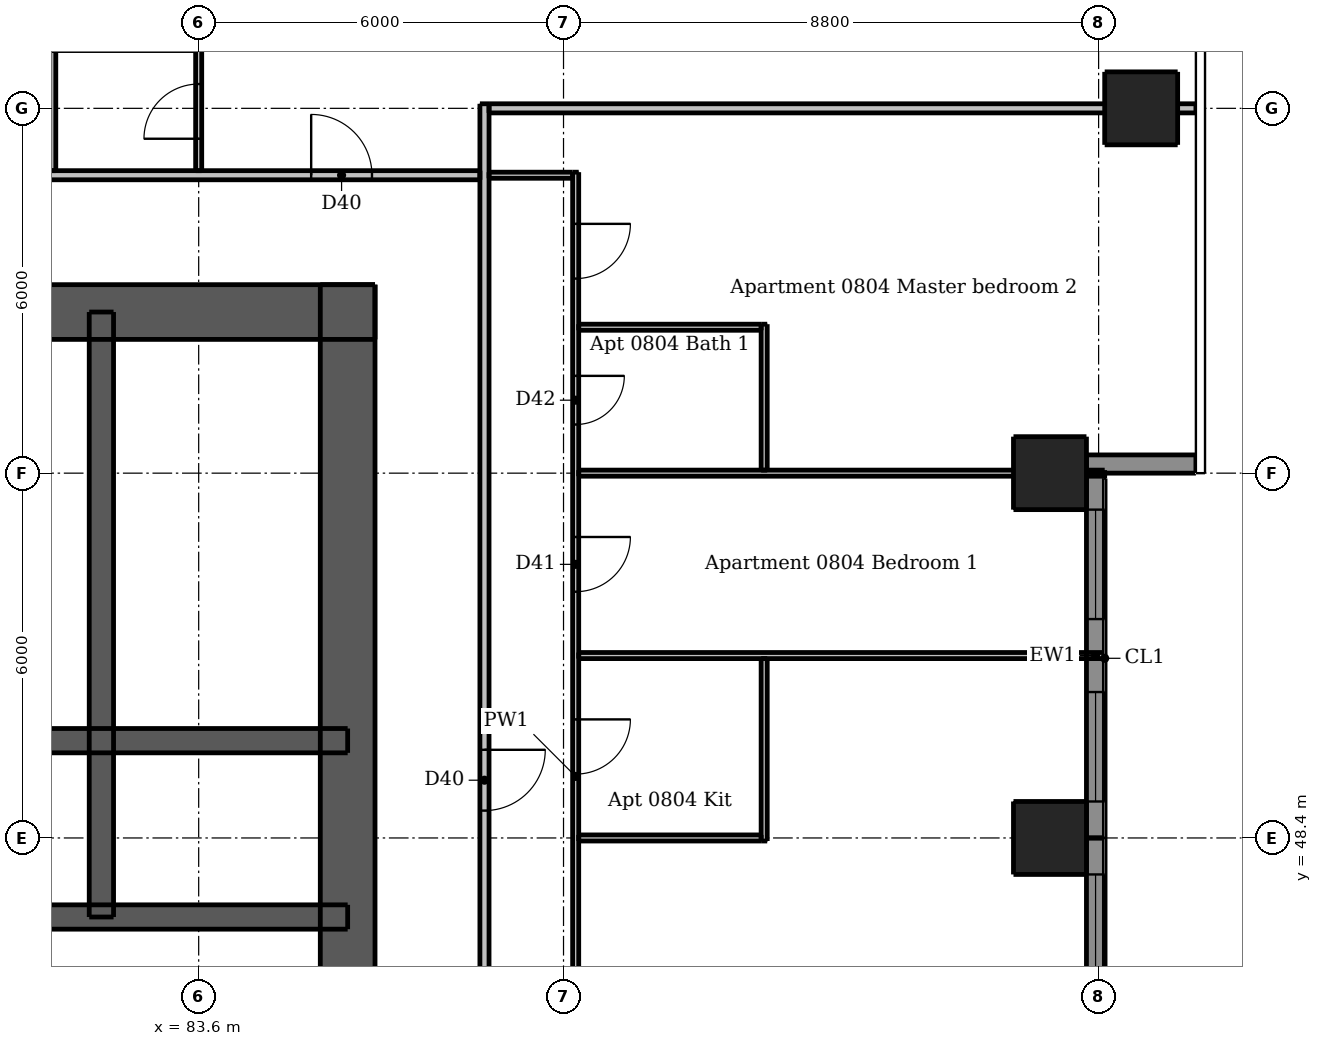
"""IFC4 building model, lengths in metres.
Left out: names, types, materials, properties, quantities, classifications, styles, units other than length and angle.
Written with IfcOpenShell. Run it as: python <this file> out.ifc"""

import sys

from ifc_helpers import new_model, si_unit, direction, frame, frame_2d, origin, origin_2d, place, context, subcontext, project, spatial, rectangle, extrude, element, fill, save


model = new_model("IFC4")
c1 = context("Model", 3, precision=1e-05, world=origin(), true_north=direction((0.0, 1.0)))
c2 = subcontext(c1, "Body", "Model", "MODEL_VIEW")
j1 = project(units=[si_unit("LENGTHUNIT", "METRE"), si_unit("PLANEANGLEUNIT", "RADIAN")], contexts=[c1])
p1 = place(None, origin())
s1 = spatial("IfcSite", under=j1, at=p1, CompositionType="ELEMENT")
p2 = place(p1, origin())
s2 = spatial("IfcBuilding", under=s1, at=p2, CompositionType="ELEMENT")
p3 = place(p2, frame((0.0, 0.0, 33.4)))
s3 = spatial("IfcBuildingStorey", under=s2, at=p3, CompositionType="ELEMENT", Elevation=33.4)
p4 = place(p3, frame((62.5, 57.05, 0.0), z_axis=(0.0, 0.0, 1.0), x_axis=(1.0, 0.0, 0.0)))
e1 = element("IfcWall", 1, at=p4, inside=s3, PredefinedType="SHEAR", context=c2, shape_type="SweptSolid", body=[
    extrude(rectangle(XDim=24.0, YDim=0.9, at=frame_2d((12.0, 0.0))), origin(), (0.0, 0.0, 1.0), 3.05),
])
p5 = place(p4, frame((20.85, 0.0, 0.0)))
e2 = element("IfcOpeningElement", 2, at=p5, cuts=e1, PredefinedType="OPENING", context=c2, shape_type="SweptSolid", body=[
    extrude(rectangle(XDim=1.1, YDim=2.1, at=frame_2d((0.55, 1.05))), frame((0.0, 0.46, 0.0), z_axis=(0.0, -1.0, 0.0), x_axis=(1.0, 0.0, 0.0)), (0.0, 0.0, 1.0), 0.92),
])
p6 = place(p4, frame((2.05, 0.0, 0.0)))
e3 = element("IfcOpeningElement", 3, at=p6, cuts=e1, PredefinedType="OPENING", context=c2, shape_type="SweptSolid", body=[
    extrude(rectangle(XDim=1.1, YDim=2.1, at=frame_2d((0.55, 1.05))), frame((0.0, 0.46, 0.0), z_axis=(0.0, -1.0, 0.0), x_axis=(1.0, 0.0, 0.0)), (0.0, 0.0, 1.0), 0.92),
])
p7 = place(p4, frame((7.9, 0.0, 0.0)))
e4 = element("IfcOpeningElement", 4, at=p7, cuts=e1, PredefinedType="OPENING", context=c2, shape_type="SweptSolid", body=[
    extrude(rectangle(XDim=0.9, YDim=2.1, at=frame_2d((0.45, 1.05))), frame((0.0, 0.46, 0.0), z_axis=(0.0, -1.0, 0.0), x_axis=(1.0, 0.0, 0.0)), (0.0, 0.0, 1.0), 0.92),
])
p8 = place(p4, frame((15.2, 0.0, 0.0)))
e5 = element("IfcOpeningElement", 5, at=p8, cuts=e1, PredefinedType="OPENING", context=c2, shape_type="SweptSolid", body=[
    extrude(rectangle(XDim=0.9, YDim=2.1, at=frame_2d((0.45, 1.05))), frame((0.0, 0.46, 0.0), z_axis=(0.0, -1.0, 0.0), x_axis=(1.0, 0.0, 0.0)), (0.0, 0.0, 1.0), 0.92),
])
p9 = place(p3, frame((86.05, 33.5, 0.0), z_axis=(0.0, 0.0, 1.0), x_axis=(0.0, 1.0, 0.0)))
e6 = element("IfcWall", 6, at=p9, inside=s3, PredefinedType="SHEAR", context=c2, shape_type="SweptSolid", body=[
    extrude(rectangle(XDim=24.0, YDim=0.9, at=frame_2d((12.0, 0.0))), origin(), (0.0, 0.0, 1.0), 3.05),
])
p10 = place(p9, frame((11.2, 0.0, 0.0)))
e7 = element("IfcOpeningElement", 7, at=p10, cuts=e6, PredefinedType="OPENING", context=c2, shape_type="SweptSolid", body=[
    extrude(rectangle(XDim=1.6, YDim=2.1, at=frame_2d((0.8, 1.05))), frame((0.0, 0.46, 0.0), z_axis=(0.0, -1.0, 0.0), x_axis=(1.0, 0.0, 0.0)), (0.0, 0.0, 1.0), 0.92),
])
p11 = place(p3, frame((62.95, 47.1, 0.0), z_axis=(0.0, 0.0, 1.0), x_axis=(1.0, 0.0, 0.0)))
e8 = element("IfcWall", 8, at=p11, inside=s3, PredefinedType="SHEAR", context=c2, shape_type="SweptSolid", body=[
    extrude(rectangle(XDim=23.1, YDim=0.4, at=frame_2d((11.55, 0.0))), origin(), (0.0, 0.0, 1.0), 3.05),
])
p12 = place(p11, frame((1.7, 0.0, 0.0)))
e9 = element("IfcOpeningElement", 9, at=p12, cuts=e8, PredefinedType="OPENING", context=c2, shape_type="SweptSolid", body=[
    extrude(rectangle(XDim=0.9, YDim=2.1, at=frame_2d((0.45, 1.05))), frame((0.0, 0.21, 0.0), z_axis=(0.0, -1.0, 0.0), x_axis=(1.0, 0.0, 0.0)), (0.0, 0.0, 1.0), 0.42),
])
p13 = place(p11, frame((20.5, 0.0, 0.0)))
e10 = element("IfcOpeningElement", 10, at=p13, cuts=e8, PredefinedType="OPENING", context=c2, shape_type="SweptSolid", body=[
    extrude(rectangle(XDim=0.9, YDim=2.1, at=frame_2d((0.45, 1.05))), frame((0.0, 0.21, 0.0), z_axis=(0.0, -1.0, 0.0), x_axis=(1.0, 0.0, 0.0)), (0.0, 0.0, 1.0), 0.42),
])
p14 = place(p3, frame((62.95, 50.0, 0.0), z_axis=(0.0, 0.0, 1.0), x_axis=(1.0, 0.0, 0.0)))
e11 = element("IfcWall", 11, at=p14, inside=s3, PredefinedType="SHEAR", context=c2, shape_type="SweptSolid", body=[
    extrude(rectangle(XDim=23.1, YDim=0.4, at=frame_2d((11.55, 0.0))), origin(), (0.0, 0.0, 1.0), 3.05),
])
p15 = place(p3, frame((82.0, 47.1, 0.0), z_axis=(0.0, 0.0, 1.0), x_axis=(0.0, 1.0, 0.0)))
e12 = element("IfcWall", 12, at=p15, inside=s3, PredefinedType="SHEAR", context=c2, shape_type="SweptSolid", body=[
    extrude(rectangle(XDim=9.95, YDim=0.4, at=frame_2d((4.975, 0.0))), origin(), (0.0, 0.0, 1.0), 3.05),
])
for number, where, z_axis, x_axis in (
    (13, (97.6, 48.4, 0.0), (0.0, 0.0, 1.0), (1.0, 0.0, 0.0)),
    (14, (97.6, 54.4, 0.0), (0.0, 0.0, 1.0), (1.0, 0.0, 0.0)),
    (15, (99.1, 60.4, 0.0), (0.0, 0.0, 1.0), (1.0, 0.0, 0.0)),
):
    element("IfcColumn", number, at=place(p3, frame(where, z_axis=z_axis, x_axis=x_axis)), inside=s3, PredefinedType="COLUMN", context=c2, shape_type="SweptSolid", body=[
        extrude(rectangle(XDim=1.2, YDim=1.2, at=origin_2d()), origin(), (0.0, 0.0, 1.0), 3.05),
    ])
p16 = place(p3, frame((98.2, 54.55, 0.0), z_axis=(0.0, 0.0, 1.0), x_axis=(1.0, 0.0, 0.0)))
e16 = element("IfcWall", 16, at=p16, inside=s3, PredefinedType="SOLIDWALL", context=c2, shape_type="SweptSolid", body=[
    extrude(rectangle(XDim=1.8, YDim=0.3, at=frame_2d((0.9, 0.0))), origin(), (0.0, 0.0, 1.0), 3.05),
])
p17 = place(p3, frame((98.35, 42.7, 0.0), z_axis=(0.0, 0.0, 1.0), x_axis=(0.0, 1.0, 0.0)))
e17 = element("IfcWall", 17, at=p17, inside=s3, PredefinedType="SOLIDWALL", context=c2, shape_type="SweptSolid", body=[
    extrude(rectangle(XDim=5.7, YDim=0.3, at=frame_2d((2.85, 0.0))), origin(), (0.0, 0.0, 1.0), 3.05),
])
p18 = place(p17, frame((0.3, 0.0, 0.15)))
e18 = element("IfcOpeningElement", 18, at=p18, cuts=e17, PredefinedType="OPENING", context=c2, shape_type="SweptSolid", body=[
    extrude(rectangle(XDim=1.8, YDim=2.1, at=frame_2d((0.9, 1.05))), frame((0.0, 0.16, 0.0), z_axis=(0.0, -1.0, 0.0), x_axis=(1.0, 0.0, 0.0)), (0.0, 0.0, 1.0), 0.32),
])
p19 = place(p17, frame((3.3, 0.0, 0.15)))
e19 = element("IfcOpeningElement", 19, at=p19, cuts=e17, PredefinedType="OPENING", context=c2, shape_type="SweptSolid", body=[
    extrude(rectangle(XDim=1.8, YDim=2.1, at=frame_2d((0.9, 1.05))), frame((0.0, 0.16, 0.0), z_axis=(0.0, -1.0, 0.0), x_axis=(1.0, 0.0, 0.0)), (0.0, 0.0, 1.0), 0.32),
])
p20 = place(p3, frame((98.35, 48.4, 0.0), z_axis=(0.0, 0.0, 1.0), x_axis=(0.0, 1.0, 0.0)))
e20 = element("IfcWall", 20, at=p20, inside=s3, PredefinedType="SOLIDWALL", context=c2, shape_type="SweptSolid", body=[
    extrude(rectangle(XDim=6.0, YDim=0.3, at=frame_2d((3.0, 0.0))), origin(), (0.0, 0.0, 1.0), 3.05),
])
p21 = place(p20, frame((0.6, 0.0, 0.15)))
e21 = element("IfcOpeningElement", 21, at=p21, cuts=e20, PredefinedType="OPENING", context=c2, shape_type="SweptSolid", body=[
    extrude(rectangle(XDim=1.8, YDim=2.1, at=frame_2d((0.9, 1.05))), frame((0.0, 0.16, 0.0), z_axis=(0.0, -1.0, 0.0), x_axis=(1.0, 0.0, 0.0)), (0.0, 0.0, 1.0), 0.32),
])
p22 = place(p20, frame((3.6, 0.0, 0.15)))
e22 = element("IfcOpeningElement", 22, at=p22, cuts=e20, PredefinedType="OPENING", context=c2, shape_type="SweptSolid", body=[
    extrude(rectangle(XDim=1.8, YDim=2.1, at=frame_2d((0.9, 1.05))), frame((0.0, 0.16, 0.0), z_axis=(0.0, -1.0, 0.0), x_axis=(1.0, 0.0, 0.0)), (0.0, 0.0, 1.0), 0.32),
])
p23 = place(p3, frame((81.2, 59.375, 0.0), z_axis=(0.0, 0.0, 1.0), x_axis=(0.0, 1.0, 0.0)))
e23 = element("IfcWall", 23, at=p23, inside=s3, PredefinedType="PARTITIONING", context=c2, shape_type="SweptSolid", body=[
    extrude(rectangle(XDim=1.975, YDim=0.1, at=frame_2d((0.988, 0.0))), origin(), (0.0, 0.0, 1.0), 3.05),
])
p24 = place(p3, frame((83.6, 59.375, 0.0), z_axis=(0.0, 0.0, 1.0), x_axis=(0.0, 1.0, 0.0)))
e24 = element("IfcWall", 24, at=p24, inside=s3, PredefinedType="PARTITIONING", context=c2, shape_type="SweptSolid", body=[
    extrude(rectangle(XDim=8.625, YDim=0.1, at=frame_2d((4.312, 0.0))), origin(), (0.0, 0.0, 1.0), 2.516),
])
p25 = place(p24, frame((0.525, 0.0, 0.0)))
e25 = element("IfcOpeningElement", 25, at=p25, cuts=e24, PredefinedType="OPENING", context=c2, shape_type="SweptSolid", body=[
    extrude(rectangle(XDim=0.9, YDim=2.1, at=frame_2d((0.45, 1.05))), frame((0.0, 0.06, 0.0), z_axis=(0.0, -1.0, 0.0), x_axis=(1.0, 0.0, 0.0)), (0.0, 0.0, 1.0), 0.12),
])
p26 = place(p24, frame((4.875, 0.0, 0.0)))
e26 = element("IfcOpeningElement", 26, at=p26, cuts=e24, PredefinedType="OPENING", context=c2, shape_type="SweptSolid", body=[
    extrude(rectangle(XDim=0.9, YDim=2.1, at=frame_2d((0.45, 1.05))), frame((0.0, 0.06, 0.0), z_axis=(0.0, -1.0, 0.0), x_axis=(1.0, 0.0, 0.0)), (0.0, 0.0, 1.0), 0.12),
])
p27 = place(p3, frame((89.8, 59.35, 0.0), z_axis=(0.0, 0.0, 1.0), x_axis=(0.0, -1.0, 0.0)))
e27 = element("IfcWall", 27, at=p27, inside=s3, PredefinedType="PARTITIONING", context=c2, shape_type="SweptSolid", body=[
    extrude(rectangle(XDim=19.875, YDim=0.1, at=frame_2d((9.938, 0.0))), origin(), (0.0, 0.0, 1.0), 3.05),
])
p28 = place(p27, frame((15.0, 0.0, 0.0)))
e28 = element("IfcOpeningElement", 28, at=p28, cuts=e27, PredefinedType="OPENING", context=c2, shape_type="SweptSolid", body=[
    extrude(rectangle(XDim=0.9, YDim=2.1, at=frame_2d((0.45, 1.05))), frame((0.0, 0.06, 0.0), z_axis=(0.0, -1.0, 0.0), x_axis=(1.0, 0.0, 0.0)), (0.0, 0.0, 1.0), 0.12),
])
p29 = place(p27, frame((9.0, 0.0, 0.0)))
e29 = element("IfcOpeningElement", 29, at=p29, cuts=e27, PredefinedType="OPENING", context=c2, shape_type="SweptSolid", body=[
    extrude(rectangle(XDim=0.9, YDim=2.1, at=frame_2d((0.45, 1.05))), frame((0.0, 0.06, 0.0), z_axis=(0.0, -1.0, 0.0), x_axis=(1.0, 0.0, 0.0)), (0.0, 0.0, 1.0), 0.12),
])
p30 = place(p27, frame((6.0, 0.0, 0.0)))
e30 = element("IfcOpeningElement", 30, at=p30, cuts=e27, PredefinedType="OPENING", context=c2, shape_type="SweptSolid", body=[
    extrude(rectangle(XDim=0.9, YDim=2.1, at=frame_2d((0.45, 1.05))), frame((0.0, 0.06, 0.0), z_axis=(0.0, -1.0, 0.0), x_axis=(1.0, 0.0, 0.0)), (0.0, 0.0, 1.0), 0.12),
])
p31 = place(p27, frame((0.85, 0.0, 0.0)))
e31 = element("IfcOpeningElement", 31, at=p31, cuts=e27, PredefinedType="OPENING", context=c2, shape_type="SweptSolid", body=[
    extrude(rectangle(XDim=0.9, YDim=2.1, at=frame_2d((0.45, 1.05))), frame((0.0, 0.06, 0.0), z_axis=(0.0, -1.0, 0.0), x_axis=(1.0, 0.0, 0.0)), (0.0, 0.0, 1.0), 0.12),
])
p32 = place(p27, frame((3.35, 0.0, 0.0)))
e32 = element("IfcOpeningElement", 32, at=p32, cuts=e27, PredefinedType="OPENING", context=c2, shape_type="SweptSolid", body=[
    extrude(rectangle(XDim=0.8, YDim=2.1, at=frame_2d((0.4, 1.05))), frame((0.0, 0.06, 0.0), z_axis=(0.0, -1.0, 0.0), x_axis=(1.0, 0.0, 0.0)), (0.0, 0.0, 1.0), 0.12),
])
p33 = place(p3, frame((92.9, 48.35, 0.0), z_axis=(0.0, 0.0, 1.0), x_axis=(0.0, 1.0, 0.0)))
e33 = element("IfcWall", 33, at=p33, inside=s3, PredefinedType="PARTITIONING", context=c2, shape_type="SweptSolid", body=[
    extrude(rectangle(XDim=3.0, YDim=0.1, at=frame_2d((1.5, 0.0))), origin(), (0.0, 0.0, 1.0), 3.05),
])
p34 = place(p3, frame((92.9, 54.45, 0.0), z_axis=(0.0, 0.0, 1.0), x_axis=(0.0, 1.0, 0.0)))
e34 = element("IfcWall", 34, at=p34, inside=s3, PredefinedType="PARTITIONING", context=c2, shape_type="SweptSolid", body=[
    extrude(rectangle(XDim=2.4, YDim=0.1, at=frame_2d((1.2, 0.0))), origin(), (0.0, 0.0, 1.0), 3.05),
])
p35 = place(p3, frame((88.375, 59.3, 0.0), z_axis=(0.0, 0.0, 1.0), x_axis=(1.0, 0.0, 0.0)))
e35 = element("IfcWall", 35, at=p35, inside=s3, PredefinedType="PARTITIONING", context=c2, shape_type="SweptSolid", body=[
    extrude(rectangle(XDim=1.375, YDim=0.1, at=frame_2d((0.688, 0.0))), origin(), (0.0, 0.0, 1.0), 3.05),
])
p36 = place(p3, frame((89.85, 56.8, 0.0), z_axis=(0.0, 0.0, 1.0), x_axis=(1.0, 0.0, 0.0)))
e36 = element("IfcWall", 36, at=p36, inside=s3, PredefinedType="PARTITIONING", context=c2, shape_type="SweptSolid", body=[
    extrude(rectangle(XDim=3.0, YDim=0.1, at=frame_2d((1.5, 0.0))), origin(), (0.0, 0.0, 1.0), 3.05),
])
p37 = place(p3, frame((89.85, 54.4, 0.0), z_axis=(0.0, 0.0, 1.0), x_axis=(1.0, 0.0, 0.0)))
e37 = element("IfcWall", 37, at=p37, inside=s3, PredefinedType="PARTITIONING", context=c2, shape_type="SweptSolid", body=[
    extrude(rectangle(XDim=8.65, YDim=0.1, at=frame_2d((4.325, 0.0))), origin(), (0.0, 0.0, 1.0), 2.516),
])
p38 = place(p3, frame((89.85, 51.4, 0.0), z_axis=(0.0, 0.0, 1.0), x_axis=(1.0, 0.0, 0.0)))
e38 = element("IfcWall", 38, at=p38, inside=s3, PredefinedType="PARTITIONING", context=c2, shape_type="SweptSolid", body=[
    extrude(rectangle(XDim=8.65, YDim=0.1, at=frame_2d((4.325, 0.0))), origin(), (0.0, 0.0, 1.0), 3.05),
])
p39 = place(p3, frame((89.85, 48.4, 0.0), z_axis=(0.0, 0.0, 1.0), x_axis=(1.0, 0.0, 0.0)))
e39 = element("IfcWall", 39, at=p39, inside=s3, PredefinedType="PARTITIONING", context=c2, shape_type="SweptSolid", body=[
    extrude(rectangle(XDim=3.0, YDim=0.1, at=frame_2d((1.5, 0.0))), origin(), (0.0, 0.0, 1.0), 2.516),
])
p40 = place(p3, frame((88.3, 60.475, 0.0), z_axis=(0.0, 0.0, 1.0), x_axis=(0.0, -1.0, 0.0)))
e40 = element("IfcWall", 40, at=p40, inside=s3, PredefinedType="PARTITIONING", context=c2, shape_type="SweptSolid", body=[
    extrude(rectangle(XDim=28.7, YDim=0.15, at=frame_2d((14.35, 0.0))), origin(), (0.0, 0.0, 1.0), 3.05),
])
p41 = place(p40, frame((27.425, 0.0, 0.0)))
e41 = element("IfcOpeningElement", 41, at=p41, cuts=e40, PredefinedType="OPENING", context=c2, shape_type="SweptSolid", body=[
    extrude(rectangle(XDim=1.0, YDim=2.1, at=frame_2d((0.5, 1.05))), frame((0.0, 0.085, 0.0), z_axis=(0.0, -1.0, 0.0), x_axis=(1.0, 0.0, 0.0)), (0.0, 0.0, 1.0), 0.17),
])
p42 = place(p40, frame((10.625, 0.0, 0.0)))
e42 = element("IfcOpeningElement", 42, at=p42, cuts=e40, PredefinedType="OPENING", context=c2, shape_type="SweptSolid", body=[
    extrude(rectangle(XDim=1.0, YDim=2.1, at=frame_2d((0.5, 1.05))), frame((0.0, 0.085, 0.0), z_axis=(0.0, -1.0, 0.0), x_axis=(1.0, 0.0, 0.0)), (0.0, 0.0, 1.0), 0.17),
])
p43 = place(p3, frame((88.375, 60.4, 0.0), z_axis=(0.0, 0.0, 1.0), x_axis=(1.0, 0.0, 0.0)))
e43 = element("IfcWall", 43, at=p43, inside=s3, PredefinedType="PARTITIONING", context=c2, shape_type="SweptSolid", body=[
    extrude(rectangle(XDim=11.625, YDim=0.15, at=frame_2d((5.812, 0.0))), origin(), (0.0, 0.0, 1.0), 2.516),
])
p44 = place(p3, frame((59.675, 59.3, 0.0), z_axis=(0.0, 0.0, 1.0), x_axis=(1.0, 0.0, 0.0)))
e44 = element("IfcWall", 44, at=p44, inside=s3, PredefinedType="PARTITIONING", context=c2, shape_type="SweptSolid", body=[
    extrude(rectangle(XDim=28.55, YDim=0.15, at=frame_2d((14.275, 0.0))), origin(), (0.0, 0.0, 1.0), 3.05),
])
p45 = place(p44, frame((8.975, 0.0, 0.0)))
e45 = element("IfcOpeningElement", 45, at=p45, cuts=e44, PredefinedType="OPENING", context=c2, shape_type="SweptSolid", body=[
    extrude(rectangle(XDim=1.0, YDim=2.1, at=frame_2d((0.5, 1.05))), frame((0.0, 0.085, 0.0), z_axis=(0.0, -1.0, 0.0), x_axis=(1.0, 0.0, 0.0)), (0.0, 0.0, 1.0), 0.17),
])
p46 = place(p44, frame((25.775, 0.0, 0.0)))
e46 = element("IfcOpeningElement", 46, at=p46, cuts=e44, PredefinedType="OPENING", context=c2, shape_type="SweptSolid", body=[
    extrude(rectangle(XDim=1.0, YDim=2.1, at=frame_2d((0.5, 1.05))), frame((0.0, 0.085, 0.0), z_axis=(0.0, -1.0, 0.0), x_axis=(1.0, 0.0, 0.0)), (0.0, 0.0, 1.0), 0.17),
])
p47 = place(p19, origin())
e47 = element("IfcWindow", 47, at=p47, inside=s3, PartitioningType="DOUBLE_PANEL_VERTICAL", PredefinedType="WINDOW", context=c2, shape_type="SweptSolid", body=[
    extrude(rectangle(XDim=1.8, YDim=2.1, at=frame_2d((0.9, 1.05))), frame((0.0, 0.03, 0.0), z_axis=(0.0, -1.0, 0.0), x_axis=(1.0, 0.0, 0.0)), (0.0, 0.0, 1.0), 0.06),
])
fill(e19, e47)
p48 = place(p21, origin())
e48 = element("IfcWindow", 48, at=p48, inside=s3, PartitioningType="DOUBLE_PANEL_VERTICAL", PredefinedType="WINDOW", context=c2, shape_type="SweptSolid", body=[
    extrude(rectangle(XDim=1.8, YDim=2.1, at=frame_2d((0.9, 1.05))), frame((0.0, 0.03, 0.0), z_axis=(0.0, -1.0, 0.0), x_axis=(1.0, 0.0, 0.0)), (0.0, 0.0, 1.0), 0.06),
])
fill(e21, e48)
p49 = place(p22, origin())
e49 = element("IfcWindow", 49, at=p49, inside=s3, PartitioningType="DOUBLE_PANEL_VERTICAL", PredefinedType="WINDOW", context=c2, shape_type="SweptSolid", body=[
    extrude(rectangle(XDim=1.8, YDim=2.1, at=frame_2d((0.9, 1.05))), frame((0.0, 0.03, 0.0), z_axis=(0.0, -1.0, 0.0), x_axis=(1.0, 0.0, 0.0)), (0.0, 0.0, 1.0), 0.06),
])
fill(e22, e49)
p50 = place(p5, origin())
e50 = element("IfcDoor", 50, at=p50, inside=s3, OperationType="SINGLE_SWING_RIGHT", PredefinedType="DOOR", context=c2, shape_type="SweptSolid", body=[
    extrude(rectangle(XDim=1.1, YDim=2.1, at=frame_2d((0.55, 1.05))), frame((0.0, -0.388, 0.0), z_axis=(0.0, -1.0, 0.0), x_axis=(1.0, 0.0, 0.0)), (0.0, 0.0, 1.0), 0.05),
])
fill(e2, e50)
p51 = place(p13, origin())
e51 = element("IfcDoor", 51, at=p51, inside=s3, OperationType="SINGLE_SWING_LEFT", PredefinedType="DOOR", context=c2, shape_type="SweptSolid", body=[
    extrude(rectangle(XDim=0.9, YDim=2.1, at=frame_2d((0.45, 1.05))), frame((0.0, 0.188, 0.0), z_axis=(0.0, -1.0, 0.0), x_axis=(1.0, 0.0, 0.0)), (0.0, 0.0, 1.0), 0.05),
])
fill(e10, e51)
p52 = place(p42, origin())
e52 = element("IfcDoor", 52, at=p52, inside=s3, OperationType="SINGLE_SWING_LEFT", PredefinedType="DOOR", context=c2, shape_type="SweptSolid", body=[
    extrude(rectangle(XDim=1.0, YDim=2.1, at=frame_2d((0.5, 1.05))), frame((0.0, 0.025, 0.0), z_axis=(0.0, -1.0, 0.0), x_axis=(1.0, 0.0, 0.0)), (0.0, 0.0, 1.0), 0.05),
])
fill(e42, e52)
p53 = place(p29, origin())
e53 = element("IfcDoor", 53, at=p53, inside=s3, OperationType="SINGLE_SWING_LEFT", PredefinedType="DOOR", context=c2, shape_type="SweptSolid", body=[
    extrude(rectangle(XDim=0.9, YDim=2.1, at=frame_2d((0.45, 1.05))), frame((0.0, 0.025, 0.0), z_axis=(0.0, -1.0, 0.0), x_axis=(1.0, 0.0, 0.0)), (0.0, 0.0, 1.0), 0.05),
])
fill(e29, e53)
p54 = place(p30, origin())
e54 = element("IfcDoor", 54, at=p54, inside=s3, OperationType="SINGLE_SWING_LEFT", PredefinedType="DOOR", context=c2, shape_type="SweptSolid", body=[
    extrude(rectangle(XDim=0.9, YDim=2.1, at=frame_2d((0.45, 1.05))), frame((0.0, 0.025, 0.0), z_axis=(0.0, -1.0, 0.0), x_axis=(1.0, 0.0, 0.0)), (0.0, 0.0, 1.0), 0.05),
])
fill(e30, e54)
p55 = place(p31, origin())
e55 = element("IfcDoor", 55, at=p55, inside=s3, OperationType="SINGLE_SWING_LEFT", PredefinedType="DOOR", context=c2, shape_type="SweptSolid", body=[
    extrude(rectangle(XDim=0.9, YDim=2.1, at=frame_2d((0.45, 1.05))), frame((0.0, 0.025, 0.0), z_axis=(0.0, -1.0, 0.0), x_axis=(1.0, 0.0, 0.0)), (0.0, 0.0, 1.0), 0.05),
])
fill(e31, e55)
p56 = place(p32, origin())
e56 = element("IfcDoor", 56, at=p56, inside=s3, OperationType="SINGLE_SWING_LEFT", PredefinedType="DOOR", context=c2, shape_type="SweptSolid", body=[
    extrude(rectangle(XDim=0.8, YDim=2.1, at=frame_2d((0.4, 1.05))), frame((0.0, 0.025, 0.0), z_axis=(0.0, -1.0, 0.0), x_axis=(1.0, 0.0, 0.0)), (0.0, 0.0, 1.0), 0.05),
])
fill(e32, e56)
p57 = place(p46, origin())
e57 = element("IfcDoor", 57, at=p57, inside=s3, OperationType="SINGLE_SWING_LEFT", PredefinedType="DOOR", context=c2, shape_type="SweptSolid", body=[
    extrude(rectangle(XDim=1.0, YDim=2.1, at=frame_2d((0.5, 1.05))), frame((0.0, 0.025, 0.0), z_axis=(0.0, -1.0, 0.0), x_axis=(1.0, 0.0, 0.0)), (0.0, 0.0, 1.0), 0.05),
])
fill(e46, e57)
p58 = place(p25, origin())
e58 = element("IfcDoor", 58, at=p58, inside=s3, OperationType="SINGLE_SWING_LEFT", PredefinedType="DOOR", context=c2, shape_type="SweptSolid", body=[
    extrude(rectangle(XDim=0.9, YDim=2.1, at=frame_2d((0.45, 1.05))), frame((0.0, 0.025, 0.0), z_axis=(0.0, -1.0, 0.0), x_axis=(1.0, 0.0, 0.0)), (0.0, 0.0, 1.0), 0.05),
])
fill(e25, e58)
save(model, sys.argv[1])
